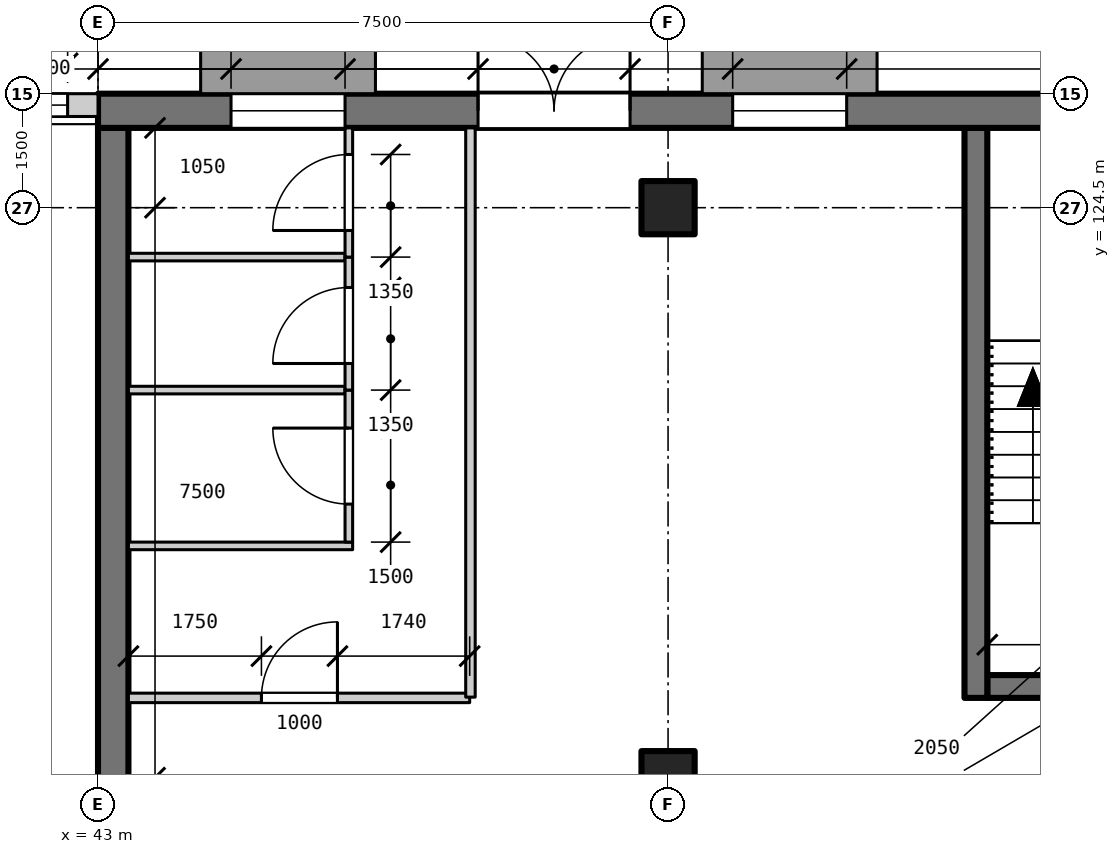
"""IFC4 building model, lengths in metres.
Left out: names, types, materials, properties, quantities, classifications, styles, units other than length and angle.
Written with IfcOpenShell. Run it as: python <this file> out.ifc"""

import sys

from ifc_helpers import new_model, si_unit, direction, frame, frame_2d, origin, origin_2d, place, context, subcontext, project, spatial, rectangle, extrude, element, fill, save


model = new_model("IFC4")
c1 = context("Model", 3, precision=1e-05, world=origin(), true_north=direction((0.0, 1.0)))
c2 = subcontext(c1, "Body", "Model", "MODEL_VIEW")
j1 = project(units=[si_unit("LENGTHUNIT", "METRE"), si_unit("PLANEANGLEUNIT", "RADIAN")], contexts=[c1])
p1 = place(None, origin())
s1 = spatial("IfcSite", under=j1, at=p1, CompositionType="ELEMENT")
p2 = place(p1, origin())
s2 = spatial("IfcBuilding", under=s1, at=p2, CompositionType="ELEMENT")
p3 = place(p2, origin())
s3 = spatial("IfcBuildingStorey", under=s2, at=p3, CompositionType="ELEMENT", Elevation=0.0)
for number, where, z_axis, x_axis in (
    (1, (50.5, 117.0, 0.0), (0.0, 0.0, 1.0), (1.0, 0.0, 0.0)),
    (2, (50.5, 124.5, 0.0), (0.0, 0.0, 1.0), (1.0, 0.0, 0.0)),
):
    element("IfcColumn", number, at=place(p3, frame(where, z_axis=z_axis, x_axis=x_axis)), inside=s3, PredefinedType="COLUMN", context=c2, shape_type="SweptSolid", body=[
        extrude(rectangle(XDim=0.7, YDim=0.7, at=origin_2d()), origin(), (0.0, 0.0, 1.0), 6.0),
    ])
p4 = place(p3, frame((43.2, 99.0, 0.0), z_axis=(0.0, 0.0, 1.0), x_axis=(0.0, 1.0, 0.0)))
e3 = element("IfcWall", 3, at=p4, inside=s3, PredefinedType="SHEAR", context=c2, shape_type="SweptSolid", body=[
    extrude(rectangle(XDim=26.55, YDim=0.4, at=frame_2d((13.275, 0.0))), origin(), (0.0, 0.0, 1.0), 6.0),
])
p5 = place(p4, frame((13.55, 0.0, 0.0)))
e4 = element("IfcOpeningElement", 4, at=p5, cuts=e3, PredefinedType="OPENING", context=c2, shape_type="SweptSolid", body=[
    extrude(rectangle(XDim=1.4, YDim=2.4, at=frame_2d((0.7, 1.2))), frame((0.0, 0.21, 0.0), z_axis=(0.0, -1.0, 0.0), x_axis=(1.0, 0.0, 0.0)), (0.0, 0.0, 1.0), 0.42),
])
p6 = place(p3, frame((54.7, 118.2, 0.0), z_axis=(0.0, 0.0, 1.0), x_axis=(1.0, 0.0, 0.0)))
e5 = element("IfcWall", 5, at=p6, inside=s3, PredefinedType="SHEAR", context=c2, shape_type="SweptSolid", body=[
    extrude(rectangle(XDim=3.0, YDim=0.3, at=frame_2d((1.5, 0.0))), origin(), (0.0, 0.0, 1.0), 6.0),
])
p7 = place(p6, frame((0.95, 0.0, 0.0)))
e6 = element("IfcOpeningElement", 6, at=p7, cuts=e5, PredefinedType="OPENING", context=c2, shape_type="SweptSolid", body=[
    extrude(rectangle(XDim=1.1, YDim=2.1, at=frame_2d((0.55, 1.05))), frame((0.0, 0.16, 0.0), z_axis=(0.0, -1.0, 0.0), x_axis=(1.0, 0.0, 0.0)), (0.0, 0.0, 1.0), 0.32),
])
p8 = place(p3, frame((54.55, 118.05, 0.0), z_axis=(0.0, 0.0, 1.0), x_axis=(0.0, 1.0, 0.0)))
e7 = element("IfcWall", 7, at=p8, inside=s3, PredefinedType="SHEAR", context=c2, shape_type="SweptSolid", body=[
    extrude(rectangle(XDim=7.5, YDim=0.3, at=frame_2d((3.75, 0.0))), origin(), (0.0, 0.0, 1.0), 6.0),
])
p9 = place(p3, frame((43.0, 125.775, 0.0), z_axis=(0.0, 0.0, 1.0), x_axis=(1.0, 0.0, 0.0)))
e8 = element("IfcWall", 8, at=p9, inside=s3, PredefinedType="SOLIDWALL", context=c2, shape_type="SweptSolid", body=[
    extrude(rectangle(XDim=14.55, YDim=0.45, at=frame_2d((7.275, 0.0))), origin(), (0.0, 0.0, 1.0), 5.7),
])
p10 = place(p9, frame((8.35, 0.0, 0.8)))
e9 = element("IfcOpeningElement", 9, at=p10, cuts=e8, PredefinedType="OPENING", context=c2, shape_type="SweptSolid", body=[
    extrude(rectangle(XDim=1.5, YDim=2.2, at=frame_2d((0.75, 1.1))), frame((0.0, 0.235, 0.0), z_axis=(0.0, -1.0, 0.0), x_axis=(1.0, 0.0, 0.0)), (0.0, 0.0, 1.0), 0.47),
])
p11 = place(p9, frame((1.75, 0.0, 0.8)))
e10 = element("IfcOpeningElement", 10, at=p11, cuts=e8, PredefinedType="OPENING", context=c2, shape_type="SweptSolid", body=[
    extrude(rectangle(XDim=1.5, YDim=2.2, at=frame_2d((0.75, 1.1))), frame((0.0, 0.235, 0.0), z_axis=(0.0, -1.0, 0.0), x_axis=(1.0, 0.0, 0.0)), (0.0, 0.0, 1.0), 0.47),
])
p12 = place(p9, frame((5.0, 0.0, 0.0)))
e11 = element("IfcOpeningElement", 11, at=p12, cuts=e8, PredefinedType="OPENING", context=c2, shape_type="SweptSolid", body=[
    extrude(rectangle(XDim=2.0, YDim=2.4, at=frame_2d((1.0, 1.2))), frame((0.0, 0.235, 0.0), z_axis=(0.0, -1.0, 0.0), x_axis=(1.0, 0.0, 0.0)), (0.0, 0.0, 1.0), 0.47),
])
p13 = place(p3, frame((15.0, 125.85, 0.0), z_axis=(0.0, 0.0, 1.0), x_axis=(1.0, 0.0, 0.0)))
e12 = element("IfcWall", 12, at=p13, inside=s3, PredefinedType="SOLIDWALL", context=c2, shape_type="SweptSolid", body=[
    extrude(rectangle(XDim=28.0, YDim=0.3, at=frame_2d((14.0, 0.0))), origin(), (0.0, 0.0, 1.0), 5.8),
])
p14 = place(p13, frame((2.3, 0.0, 0.0)))
e13 = element("IfcOpeningElement", 13, at=p14, cuts=e12, PredefinedType="OPENING", context=c2, shape_type="SweptSolid", body=[
    extrude(rectangle(XDim=2.4, YDim=2.4, at=frame_2d((1.2, 1.2))), frame((0.0, 0.16, 0.0), z_axis=(0.0, -1.0, 0.0), x_axis=(1.0, 0.0, 0.0)), (0.0, 0.0, 1.0), 0.32),
])
p15 = place(p13, frame((2.3, 0.0, 2.6)))
e14 = element("IfcOpeningElement", 14, at=p15, cuts=e12, PredefinedType="OPENING", context=c2, shape_type="SweptSolid", body=[
    extrude(rectangle(XDim=2.4, YDim=1.4, at=frame_2d((1.2, 0.7))), frame((0.0, 0.16, 0.0), z_axis=(0.0, -1.0, 0.0), x_axis=(1.0, 0.0, 0.0)), (0.0, 0.0, 1.0), 0.32),
])
p16 = place(p13, frame((9.3, 0.0, 0.0)))
e15 = element("IfcOpeningElement", 15, at=p16, cuts=e12, PredefinedType="OPENING", context=c2, shape_type="SweptSolid", body=[
    extrude(rectangle(XDim=2.4, YDim=2.4, at=frame_2d((1.2, 1.2))), frame((0.0, 0.16, 0.0), z_axis=(0.0, -1.0, 0.0), x_axis=(1.0, 0.0, 0.0)), (0.0, 0.0, 1.0), 0.32),
])
p17 = place(p13, frame((9.3, 0.0, 2.6)))
e16 = element("IfcOpeningElement", 16, at=p17, cuts=e12, PredefinedType="OPENING", context=c2, shape_type="SweptSolid", body=[
    extrude(rectangle(XDim=2.4, YDim=1.4, at=frame_2d((1.2, 0.7))), frame((0.0, 0.16, 0.0), z_axis=(0.0, -1.0, 0.0), x_axis=(1.0, 0.0, 0.0)), (0.0, 0.0, 1.0), 0.32),
])
p18 = place(p13, frame((16.3, 0.0, 0.0)))
e17 = element("IfcOpeningElement", 17, at=p18, cuts=e12, PredefinedType="OPENING", context=c2, shape_type="SweptSolid", body=[
    extrude(rectangle(XDim=2.4, YDim=2.4, at=frame_2d((1.2, 1.2))), frame((0.0, 0.16, 0.0), z_axis=(0.0, -1.0, 0.0), x_axis=(1.0, 0.0, 0.0)), (0.0, 0.0, 1.0), 0.32),
])
p19 = place(p13, frame((16.3, 0.0, 2.6)))
e18 = element("IfcOpeningElement", 18, at=p19, cuts=e12, PredefinedType="OPENING", context=c2, shape_type="SweptSolid", body=[
    extrude(rectangle(XDim=2.4, YDim=1.4, at=frame_2d((1.2, 0.7))), frame((0.0, 0.16, 0.0), z_axis=(0.0, -1.0, 0.0), x_axis=(1.0, 0.0, 0.0)), (0.0, 0.0, 1.0), 0.32),
])
p20 = place(p13, frame((23.3, 0.0, 0.0)))
e19 = element("IfcOpeningElement", 19, at=p20, cuts=e12, PredefinedType="OPENING", context=c2, shape_type="SweptSolid", body=[
    extrude(rectangle(XDim=2.4, YDim=2.4, at=frame_2d((1.2, 1.2))), frame((0.0, 0.16, 0.0), z_axis=(0.0, -1.0, 0.0), x_axis=(1.0, 0.0, 0.0)), (0.0, 0.0, 1.0), 0.32),
])
p21 = place(p13, frame((23.3, 0.0, 2.6)))
e20 = element("IfcOpeningElement", 20, at=p21, cuts=e12, PredefinedType="OPENING", context=c2, shape_type="SweptSolid", body=[
    extrude(rectangle(XDim=2.4, YDim=1.4, at=frame_2d((1.2, 0.7))), frame((0.0, 0.16, 0.0), z_axis=(0.0, -1.0, 0.0), x_axis=(1.0, 0.0, 0.0)), (0.0, 0.0, 1.0), 0.32),
])
p22 = place(p13, frame((0.4, 0.0, 0.6)))
e21 = element("IfcOpeningElement", 21, at=p22, cuts=e12, PredefinedType="OPENING", context=c2, shape_type="SweptSolid", body=[
    extrude(rectangle(XDim=1.5, YDim=3.6, at=frame_2d((0.75, 1.8))), frame((0.0, 0.16, 0.0), z_axis=(0.0, -1.0, 0.0), x_axis=(1.0, 0.0, 0.0)), (0.0, 0.0, 1.0), 0.32),
])
p23 = place(p13, frame((5.2, 0.0, 0.6)))
e22 = element("IfcOpeningElement", 22, at=p23, cuts=e12, PredefinedType="OPENING", context=c2, shape_type="SweptSolid", body=[
    extrude(rectangle(XDim=3.6, YDim=3.6, at=frame_2d((1.8, 1.8))), frame((0.0, 0.16, 0.0), z_axis=(0.0, -1.0, 0.0), x_axis=(1.0, 0.0, 0.0)), (0.0, 0.0, 1.0), 0.32),
])
p24 = place(p13, frame((12.2, 0.0, 0.6)))
e23 = element("IfcOpeningElement", 23, at=p24, cuts=e12, PredefinedType="OPENING", context=c2, shape_type="SweptSolid", body=[
    extrude(rectangle(XDim=3.6, YDim=3.6, at=frame_2d((1.8, 1.8))), frame((0.0, 0.16, 0.0), z_axis=(0.0, -1.0, 0.0), x_axis=(1.0, 0.0, 0.0)), (0.0, 0.0, 1.0), 0.32),
])
p25 = place(p13, frame((19.2, 0.0, 0.6)))
e24 = element("IfcOpeningElement", 24, at=p25, cuts=e12, PredefinedType="OPENING", context=c2, shape_type="SweptSolid", body=[
    extrude(rectangle(XDim=3.6, YDim=3.6, at=frame_2d((1.8, 1.8))), frame((0.0, 0.16, 0.0), z_axis=(0.0, -1.0, 0.0), x_axis=(1.0, 0.0, 0.0)), (0.0, 0.0, 1.0), 0.32),
])
p26 = place(p13, frame((26.1, 0.0, 0.6)))
e25 = element("IfcOpeningElement", 25, at=p26, cuts=e12, PredefinedType="OPENING", context=c2, shape_type="SweptSolid", body=[
    extrude(rectangle(XDim=1.5, YDim=3.6, at=frame_2d((0.75, 1.8))), frame((0.0, 0.16, 0.0), z_axis=(0.0, -1.0, 0.0), x_axis=(1.0, 0.0, 0.0)), (0.0, 0.0, 1.0), 0.32),
])
p27 = place(p3, frame((43.4, 118.05, 0.0), z_axis=(0.0, 0.0, 1.0), x_axis=(1.0, 0.0, 0.0)))
e26 = element("IfcWall", 26, at=p27, inside=s3, PredefinedType="PARTITIONING", context=c2, shape_type="SweptSolid", body=[
    extrude(rectangle(XDim=4.49, YDim=0.125, at=frame_2d((2.245, 0.0))), origin(), (0.0, 0.0, 1.0), 5.7),
])
p28 = place(p27, frame((1.75, 0.0, 0.0)))
e27 = element("IfcOpeningElement", 27, at=p28, cuts=e26, PredefinedType="OPENING", context=c2, shape_type="SweptSolid", body=[
    extrude(rectangle(XDim=1.0, YDim=2.1, at=frame_2d((0.5, 1.05))), frame((0.0, 0.073, 0.0), z_axis=(0.0, -1.0, 0.0), x_axis=(1.0, 0.0, 0.0)), (0.0, 0.0, 1.0), 0.145),
])
p29 = place(p3, frame((43.4, 120.05, 0.0), z_axis=(0.0, 0.0, 1.0), x_axis=(1.0, 0.0, 0.0)))
e28 = element("IfcWall", 28, at=p29, inside=s3, PredefinedType="PARTITIONING", context=c2, shape_type="SweptSolid", body=[
    extrude(rectangle(XDim=2.95, YDim=0.1, at=frame_2d((1.475, 0.0))), origin(), (0.0, 0.0, 1.0), 5.7),
])
for number, where, z_axis, x_axis in (
    (29, (43.4, 122.1, 0.0), (0.0, 0.0, 1.0), (1.0, 0.0, 0.0)),
    (30, (43.4, 123.85, 0.0), (0.0, 0.0, 1.0), (1.0, 0.0, 0.0)),
):
    element("IfcWall", number, at=place(p3, frame(where, z_axis=z_axis, x_axis=x_axis)), inside=s3, PredefinedType="PARTITIONING", context=c2, shape_type="SweptSolid", body=[
        extrude(rectangle(XDim=2.85, YDim=0.1, at=frame_2d((1.425, 0.0))), origin(), (0.0, 0.0, 1.0), 5.7),
    ])
p30 = place(p3, frame((46.3, 120.1, 0.0), z_axis=(0.0, 0.0, 1.0), x_axis=(0.0, 1.0, 0.0)))
e31 = element("IfcWall", 31, at=p30, inside=s3, PredefinedType="PARTITIONING", context=c2, shape_type="SweptSolid", body=[
    extrude(rectangle(XDim=2.0, YDim=0.1, at=frame_2d((1.0, 0.0))), origin(), (0.0, 0.0, 1.0), 5.7),
])
p31 = place(p30, frame((0.5, 0.0, 0.0)))
e32 = element("IfcOpeningElement", 32, at=p31, cuts=e31, PredefinedType="OPENING", context=c2, shape_type="SweptSolid", body=[
    extrude(rectangle(XDim=1.0, YDim=2.1, at=frame_2d((0.5, 1.05))), frame((0.0, 0.06, 0.0), z_axis=(0.0, -1.0, 0.0), x_axis=(1.0, 0.0, 0.0)), (0.0, 0.0, 1.0), 0.12),
])
p32 = place(p3, frame((46.3, 122.1, 0.0), z_axis=(0.0, 0.0, 1.0), x_axis=(0.0, 1.0, 0.0)))
e33 = element("IfcWall", 33, at=p32, inside=s3, PredefinedType="PARTITIONING", context=c2, shape_type="SweptSolid", body=[
    extrude(rectangle(XDim=1.75, YDim=0.1, at=frame_2d((0.875, 0.0))), origin(), (0.0, 0.0, 1.0), 5.7),
])
p33 = place(p32, frame((0.35, 0.0, 0.0)))
e34 = element("IfcOpeningElement", 34, at=p33, cuts=e33, PredefinedType="OPENING", context=c2, shape_type="SweptSolid", body=[
    extrude(rectangle(XDim=1.0, YDim=2.1, at=frame_2d((0.5, 1.05))), frame((0.0, 0.06, 0.0), z_axis=(0.0, -1.0, 0.0), x_axis=(1.0, 0.0, 0.0)), (0.0, 0.0, 1.0), 0.12),
])
p34 = place(p3, frame((46.3, 123.85, 0.0), z_axis=(0.0, 0.0, 1.0), x_axis=(0.0, 1.0, 0.0)))
e35 = element("IfcWall", 35, at=p34, inside=s3, PredefinedType="PARTITIONING", context=c2, shape_type="SweptSolid", body=[
    extrude(rectangle(XDim=1.7, YDim=0.1, at=frame_2d((0.85, 0.0))), origin(), (0.0, 0.0, 1.0), 5.7),
])
p35 = place(p34, frame((0.35, 0.0, 0.0)))
e36 = element("IfcOpeningElement", 36, at=p35, cuts=e35, PredefinedType="OPENING", context=c2, shape_type="SweptSolid", body=[
    extrude(rectangle(XDim=1.0, YDim=2.1, at=frame_2d((0.5, 1.05))), frame((0.0, 0.06, 0.0), z_axis=(0.0, -1.0, 0.0), x_axis=(1.0, 0.0, 0.0)), (0.0, 0.0, 1.0), 0.12),
])
p36 = place(p3, frame((47.9, 118.06, 0.0), z_axis=(0.0, 0.0, 1.0), x_axis=(0.0, 1.0, 0.0)))
e37 = element("IfcWall", 37, at=p36, inside=s3, PredefinedType="PARTITIONING", context=c2, shape_type="SweptSolid", body=[
    extrude(rectangle(XDim=7.49, YDim=0.125, at=frame_2d((3.745, 0.0))), origin(), (0.0, 0.0, 1.0), 5.7),
])
p37 = place(p10, origin())
e38 = element("IfcWindow", 38, at=p37, inside=s3, PartitioningType="SINGLE_PANEL", PredefinedType="WINDOW", context=c2, shape_type="SweptSolid", body=[
    extrude(rectangle(XDim=1.5, YDim=2.2, at=frame_2d((0.75, 1.1))), frame((0.0, -0.075, 0.0), z_axis=(0.0, -1.0, 0.0), x_axis=(1.0, 0.0, 0.0)), (0.0, 0.0, 1.0), 0.06),
])
fill(e9, e38)
p38 = place(p11, origin())
e39 = element("IfcWindow", 39, at=p38, inside=s3, PartitioningType="SINGLE_PANEL", PredefinedType="WINDOW", context=c2, shape_type="SweptSolid", body=[
    extrude(rectangle(XDim=1.5, YDim=2.2, at=frame_2d((0.75, 1.1))), frame((0.0, -0.075, 0.0), z_axis=(0.0, -1.0, 0.0), x_axis=(1.0, 0.0, 0.0)), (0.0, 0.0, 1.0), 0.06),
])
fill(e10, e39)
p39 = place(p26, origin())
e40 = element("IfcWindow", 40, at=p39, inside=s3, PartitioningType="SINGLE_PANEL", PredefinedType="WINDOW", context=c2, shape_type="SweptSolid", body=[
    extrude(rectangle(XDim=1.5, YDim=3.6, at=frame_2d((0.75, 1.8))), frame((0.0, -0.05, 0.0), z_axis=(0.0, -1.0, 0.0), x_axis=(1.0, 0.0, 0.0)), (0.0, 0.0, 1.0), 0.06),
])
fill(e25, e40)
p40 = place(p12, origin())
e41 = element("IfcDoor", 41, at=p40, inside=s3, OperationType="DOUBLE_DOOR_DOUBLE_SWING", PredefinedType="DOOR", context=c2, shape_type="SweptSolid", body=[
    extrude(rectangle(XDim=2.0, YDim=2.4, at=frame_2d((1.0, 1.2))), frame((0.0, 0.025, 0.0), z_axis=(0.0, -1.0, 0.0), x_axis=(1.0, 0.0, 0.0)), (0.0, 0.0, 1.0), 0.05),
])
fill(e11, e41)
p41 = place(p28, origin())
e42 = element("IfcDoor", 42, at=p41, inside=s3, OperationType="SINGLE_SWING_RIGHT", PredefinedType="DOOR", context=c2, shape_type="SweptSolid", body=[
    extrude(rectangle(XDim=1.0, YDim=2.1, at=frame_2d((0.5, 1.05))), frame((0.0, 0.025, 0.0), z_axis=(0.0, -1.0, 0.0), x_axis=(1.0, 0.0, 0.0)), (0.0, 0.0, 1.0), 0.05),
])
fill(e27, e42)
p42 = place(p31, origin())
e43 = element("IfcDoor", 43, at=p42, inside=s3, OperationType="SINGLE_SWING_RIGHT", PredefinedType="DOOR", context=c2, shape_type="SweptSolid", body=[
    extrude(rectangle(XDim=1.0, YDim=2.1, at=frame_2d((0.5, 1.05))), frame((0.0, 0.025, 0.0), z_axis=(0.0, -1.0, 0.0), x_axis=(1.0, 0.0, 0.0)), (0.0, 0.0, 1.0), 0.05),
])
fill(e32, e43)
p43 = place(p33, origin())
e44 = element("IfcDoor", 44, at=p43, inside=s3, OperationType="SINGLE_SWING_LEFT", PredefinedType="DOOR", context=c2, shape_type="SweptSolid", body=[
    extrude(rectangle(XDim=1.0, YDim=2.1, at=frame_2d((0.5, 1.05))), frame((0.0, 0.025, 0.0), z_axis=(0.0, -1.0, 0.0), x_axis=(1.0, 0.0, 0.0)), (0.0, 0.0, 1.0), 0.05),
])
fill(e34, e44)
p44 = place(p35, origin())
e45 = element("IfcDoor", 45, at=p44, inside=s3, OperationType="SINGLE_SWING_LEFT", PredefinedType="DOOR", context=c2, shape_type="SweptSolid", body=[
    extrude(rectangle(XDim=1.0, YDim=2.1, at=frame_2d((0.5, 1.05))), frame((0.0, 0.025, 0.0), z_axis=(0.0, -1.0, 0.0), x_axis=(1.0, 0.0, 0.0)), (0.0, 0.0, 1.0), 0.05),
])
fill(e36, e45)
save(model, sys.argv[1])
